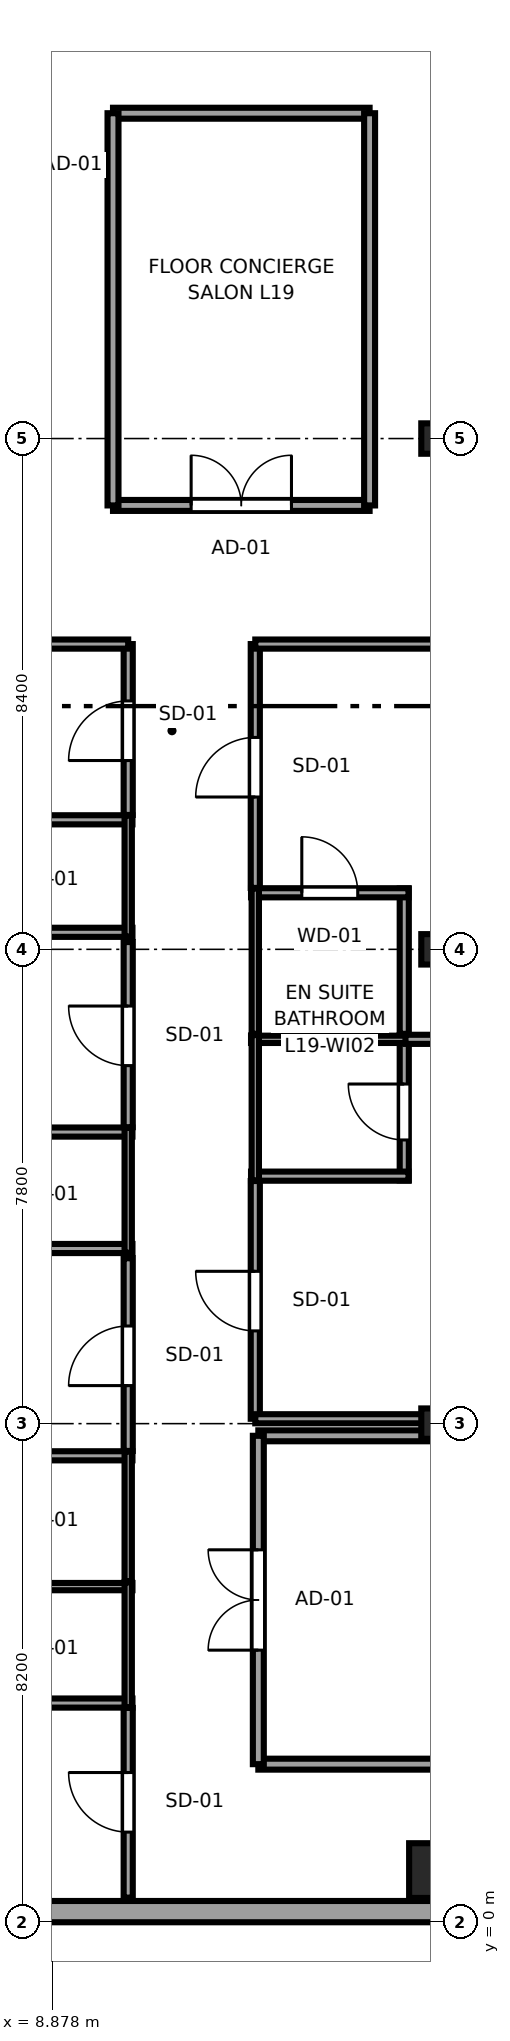
"""IFC4 building model, lengths in metres.
Left out: names, types, materials, properties, quantities, classifications, styles, units other than length and angle.
Written with IfcOpenShell. Run it as: python <this file> out.ifc"""

import sys

from ifc_helpers import new_model, si_unit, direction, frame, frame_2d, origin, origin_2d, place, context, subcontext, project, spatial, rectangle, i_section, extrude, source, transform, mapped, element, fill, save


model = new_model("IFC4")
c1 = context("Model", 3, precision=1e-05, world=origin(), true_north=direction((0.0, 1.0)))
c2 = subcontext(c1, "Body", "Model", "MODEL_VIEW")
j1 = project(units=[si_unit("LENGTHUNIT", "METRE"), si_unit("PLANEANGLEUNIT", "RADIAN")], contexts=[c1])
p1 = place(None, origin())
s1 = spatial("IfcSite", under=j1, at=p1, CompositionType="ELEMENT")
p2 = place(p1, origin())
s2 = spatial("IfcBuilding", under=s1, at=p2, CompositionType="ELEMENT")
p3 = place(p2, frame((0.0, 0.0, 78.15)))
s3 = spatial("IfcBuildingStorey", under=s2, at=p3, CompositionType="ELEMENT", Elevation=78.15)
m1 = source(origin(), c2, "Body", "SweptSolid", [
    extrude(rectangle(XDim=0.9, YDim=0.9, at=origin_2d()), origin(), (0.0, 0.0, 1.0), 3.55),
])
p4 = place(p3, frame((15.2, 0.85, 0.0), z_axis=(0.0, 0.0, 1.0), x_axis=(1.0, 0.0, 0.0)))
e1 = element("IfcColumn", 1, at=p4, inside=s3, PredefinedType="COLUMN", context=c2, shape_type="MappedRepresentation", body=[
    mapped(m1, transform((0.0, 0.0, 0.0), x_axis=(1.0, 0.0, 0.0), y_axis=(0.0, 1.0, 0.0), z_axis=(0.0, 0.0, 1.0), scale=1.0)),
])
m2 = source(origin(), c2, "Body", "SweptSolid", [
    extrude(i_section(OverallWidth=0.5, OverallDepth=0.5, WebThickness=0.022, FlangeThickness=0.034, at=origin_2d()), origin(), (0.0, 0.0, 1.0), 3.55),
])
for number, where, z_axis, x_axis in (
    (2, (15.2, 8.2, 0.0), (0.0, 0.0, 1.0), (1.0, 0.0, 0.0)),
    (3, (15.2, 16.0, 0.0), (0.0, 0.0, 1.0), (1.0, 0.0, 0.0)),
    (4, (15.2, 24.4, 0.0), (0.0, 0.0, 1.0), (1.0, 0.0, 0.0)),
):
    element("IfcColumn", number, at=place(p3, frame(where, z_axis=z_axis, x_axis=x_axis)), inside=s3, PredefinedType="COLUMN", context=c2, shape_type="MappedRepresentation", body=[
        mapped(m2, transform((0.0, 0.0, 0.0), x_axis=(1.0, 0.0, 0.0), y_axis=(0.0, 1.0, 0.0), z_axis=(0.0, 0.0, 1.0), scale=1.0)),
    ])
p5 = place(p3, frame((4.617, 0.175, 0.0), z_axis=(0.0, 0.0, 1.0), x_axis=(1.0, 0.0, 0.0)))
e5 = element("IfcWall", 5, at=p5, inside=s3, PredefinedType="SOLIDWALL", context=c2, shape_type="SweptSolid", body=[
    extrude(rectangle(XDim=18.008, YDim=0.35, at=frame_2d((9.004, 0.0))), origin(), (0.0, 0.0, 1.0), 3.37),
])
p6 = place(p5, frame((14.332, 0.0, 0.68)))
e6 = element("IfcOpeningElement", 6, at=p6, cuts=e5, PredefinedType="OPENING", context=c2, shape_type="SweptSolid", body=[
    extrude(rectangle(XDim=1.95, YDim=1.82, at=frame_2d((0.975, 0.91))), frame((0.0, 0.185, 0.0), z_axis=(0.0, -1.0, 0.0), x_axis=(1.0, 0.0, 0.0)), (0.0, 0.0, 1.0), 0.37),
])
p7 = place(p5, frame((2.091, 0.0, 0.62)))
e7 = element("IfcOpeningElement", 7, at=p7, cuts=e5, PredefinedType="OPENING", context=c2, shape_type="SweptSolid", body=[
    extrude(rectangle(XDim=1.5, YDim=1.55, at=frame_2d((0.75, 0.775))), frame((0.0, 0.185, 0.0), z_axis=(0.0, -1.0, 0.0), x_axis=(1.0, 0.0, 0.0)), (0.0, 0.0, 1.0), 0.37),
])
p8 = place(p3, frame((7.61, 3.605, 0.0), z_axis=(0.0, 0.0, 1.0), x_axis=(1.0, 0.0, 0.0)))
e8 = element("IfcWall", 8, at=p8, inside=s3, PredefinedType="PARTITIONING", context=c2, shape_type="SweptSolid", body=[
    extrude(rectangle(XDim=2.59, YDim=0.15, at=frame_2d((1.295, 0.0))), origin(), (0.0, 0.0, 1.0), 3.37),
])
p9 = place(p3, frame((7.61, 5.52, 0.0), z_axis=(0.0, 0.0, 1.0), x_axis=(1.0, 0.0, 0.0)))
e9 = element("IfcWall", 9, at=p9, inside=s3, PredefinedType="PLUMBINGWALL", context=c2, shape_type="SweptSolid", body=[
    extrude(rectangle(XDim=2.59, YDim=0.12, at=frame_2d((1.295, 0.0))), origin(), (0.0, 0.0, 1.0), 3.37),
])
p10 = place(p3, frame((10.13, 3.535, 0.0), z_axis=(0.0, 0.0, 1.0), x_axis=(0.0, 1.0, 0.0)))
e10 = element("IfcWall", 10, at=p10, inside=s3, PredefinedType="PLUMBINGWALL", context=c2, shape_type="SweptSolid", body=[
    extrude(rectangle(XDim=2.055, YDim=0.12, at=frame_2d((1.028, 0.0))), origin(), (0.0, 0.0, 1.0), 3.37),
])
p11 = place(p3, frame((7.61, 7.671, 0.0), z_axis=(0.0, 0.0, 1.0), x_axis=(1.0, 0.0, 0.0)))
e11 = element("IfcWall", 11, at=p11, inside=s3, PredefinedType="PARTITIONING", context=c2, shape_type="SweptSolid", body=[
    extrude(rectangle(XDim=2.59, YDim=0.15, at=frame_2d((1.295, 0.0))), origin(), (0.0, 0.0, 1.0), 3.37),
])
p12 = place(p3, frame((10.13, 5.61, 0.0), z_axis=(0.0, 0.0, 1.0), x_axis=(0.0, 1.0, 0.0)))
e12 = element("IfcWall", 12, at=p12, inside=s3, PredefinedType="PLUMBINGWALL", context=c2, shape_type="SweptSolid", body=[
    extrude(rectangle(XDim=2.131, YDim=0.12, at=frame_2d((1.065, 0.0))), origin(), (0.0, 0.0, 1.0), 3.37),
])
p13 = place(p3, frame((0.405, 11.08, 0.0), z_axis=(0.0, 0.0, 1.0), x_axis=(1.0, 0.0, 0.0)))
e13 = element("IfcWall", 13, at=p13, inside=s3, PredefinedType="PARTITIONING", context=c2, shape_type="SweptSolid", body=[
    extrude(rectangle(XDim=9.795, YDim=0.15, at=frame_2d((4.897, 0.0))), origin(), (0.0, 0.0, 1.0), 3.37),
])
p14 = place(p3, frame((7.61, 12.995, 0.0), z_axis=(0.0, 0.0, 1.0), x_axis=(1.0, 0.0, 0.0)))
e14 = element("IfcWall", 14, at=p14, inside=s3, PredefinedType="PARTITIONING", context=c2, shape_type="SweptSolid", body=[
    extrude(rectangle(XDim=2.59, YDim=0.15, at=frame_2d((1.295, 0.0))), origin(), (0.0, 0.0, 1.0), 3.37),
])
p15 = place(p3, frame((10.13, 11.01, 0.0), z_axis=(0.0, 0.0, 1.0), x_axis=(0.0, 1.0, 0.0)))
e15 = element("IfcWall", 15, at=p15, inside=s3, PredefinedType="PLUMBINGWALL", context=c2, shape_type="SweptSolid", body=[
    extrude(rectangle(XDim=2.055, YDim=0.12, at=frame_2d((1.027, 0.0))), origin(), (0.0, 0.0, 1.0), 3.37),
])
p16 = place(p3, frame((0.405, 16.28, 0.0), z_axis=(0.0, 0.0, 1.0), x_axis=(1.0, 0.0, 0.0)))
e16 = element("IfcWall", 16, at=p16, inside=s3, PredefinedType="PARTITIONING", context=c2, shape_type="SweptSolid", body=[
    extrude(rectangle(XDim=9.795, YDim=0.15, at=frame_2d((4.897, 0.0))), origin(), (0.0, 0.0, 1.0), 3.37),
])
p17 = place(p3, frame((7.61, 18.13, 0.0), z_axis=(0.0, 0.0, 1.0), x_axis=(1.0, 0.0, 0.0)))
e17 = element("IfcWall", 17, at=p17, inside=s3, PredefinedType="PARTITIONING", context=c2, shape_type="SweptSolid", body=[
    extrude(rectangle(XDim=2.59, YDim=0.15, at=frame_2d((1.295, 0.0))), origin(), (0.0, 0.0, 1.0), 3.37),
])
p18 = place(p3, frame((10.13, 16.21, 0.0), z_axis=(0.0, 0.0, 1.0), x_axis=(0.0, 1.0, 0.0)))
e18 = element("IfcWall", 18, at=p18, inside=s3, PredefinedType="PLUMBINGWALL", context=c2, shape_type="SweptSolid", body=[
    extrude(rectangle(XDim=1.99, YDim=0.12, at=frame_2d((0.995, 0.0))), origin(), (0.0, 0.0, 1.0), 3.37),
])
p19 = place(p3, frame((14.67, 12.2, 0.0), z_axis=(0.0, 0.0, 1.0), x_axis=(0.0, 1.0, 0.0)))
e19 = element("IfcWall", 19, at=p19, inside=s3, PredefinedType="PARTITIONING", context=c2, shape_type="SweptSolid", body=[
    extrude(rectangle(XDim=2.39, YDim=0.15, at=frame_2d((1.195, 0.0))), origin(), (0.0, 0.0, 1.0), 3.37),
])
p20 = place(p19, frame((0.665, 0.0, 0.0)))
e20 = element("IfcOpeningElement", 20, at=p20, cuts=e19, PredefinedType="OPENING", context=c2, shape_type="SweptSolid", body=[
    extrude(rectangle(XDim=0.92, YDim=2.01, at=frame_2d((0.46, 1.005))), frame((0.0, 0.085, 0.0), z_axis=(0.0, -1.0, 0.0), x_axis=(1.0, 0.0, 0.0)), (0.0, 0.0, 1.0), 0.17),
])
p21 = place(p3, frame((12.15, 12.27, 0.0), z_axis=(0.0, 0.0, 1.0), x_axis=(1.0, 0.0, 0.0)))
e21 = element("IfcWall", 21, at=p21, inside=s3, PredefinedType="PARTITIONING", context=c2, shape_type="SweptSolid", body=[
    extrude(rectangle(XDim=2.59, YDim=0.15, at=frame_2d((1.295, 0.0))), origin(), (0.0, 0.0, 1.0), 3.37),
])
p22 = place(p3, frame((12.15, 14.52, 0.0), z_axis=(0.0, 0.0, 1.0), x_axis=(1.0, 0.0, 0.0)))
e22 = element("IfcWall", 22, at=p22, inside=s3, PredefinedType="PLUMBINGWALL", context=c2, shape_type="SweptSolid", body=[
    extrude(rectangle(XDim=2.59, YDim=0.12, at=frame_2d((1.295, 0.0))), origin(), (0.0, 0.0, 1.0), 3.37),
])
p23 = place(p3, frame((12.22, 12.2, 0.0), z_axis=(0.0, 0.0, 1.0), x_axis=(0.0, 1.0, 0.0)))
e23 = element("IfcWall", 23, at=p23, inside=s3, PredefinedType="PLUMBINGWALL", context=c2, shape_type="SweptSolid", body=[
    extrude(rectangle(XDim=2.39, YDim=0.12, at=frame_2d((1.195, 0.0))), origin(), (0.0, 0.0, 1.0), 3.37),
])
p24 = place(p3, frame((14.67, 14.61, 0.0), z_axis=(0.0, 0.0, 1.0), x_axis=(0.0, 1.0, 0.0)))
e24 = element("IfcWall", 24, at=p24, inside=s3, PredefinedType="PARTITIONING", context=c2, shape_type="SweptSolid", body=[
    extrude(rectangle(XDim=2.39, YDim=0.15, at=frame_2d((1.195, 0.0))), origin(), (0.0, 0.0, 1.0), 3.37),
])
p25 = place(p3, frame((12.15, 16.93, 0.0), z_axis=(0.0, 0.0, 1.0), x_axis=(1.0, 0.0, 0.0)))
e25 = element("IfcWall", 25, at=p25, inside=s3, PredefinedType="PARTITIONING", context=c2, shape_type="SweptSolid", body=[
    extrude(rectangle(XDim=2.59, YDim=0.15, at=frame_2d((1.295, 0.0))), origin(), (0.0, 0.0, 1.0), 3.37),
])
p26 = place(p25, frame((0.835, 0.0, 0.0)))
e26 = element("IfcOpeningElement", 26, at=p26, cuts=e25, PredefinedType="OPENING", context=c2, shape_type="SweptSolid", body=[
    extrude(rectangle(XDim=0.92, YDim=2.01, at=frame_2d((0.46, 1.005))), frame((0.0, 0.085, 0.0), z_axis=(0.0, -1.0, 0.0), x_axis=(1.0, 0.0, 0.0)), (0.0, 0.0, 1.0), 0.17),
])
p27 = place(p3, frame((12.22, 14.61, 0.0), z_axis=(0.0, 0.0, 1.0), x_axis=(0.0, 1.0, 0.0)))
e27 = element("IfcWall", 27, at=p27, inside=s3, PredefinedType="PLUMBINGWALL", context=c2, shape_type="SweptSolid", body=[
    extrude(rectangle(XDim=2.39, YDim=0.12, at=frame_2d((1.195, 0.0))), origin(), (0.0, 0.0, 1.0), 3.37),
])
p28 = place(p3, frame((10.13, 0.405, 0.0), z_axis=(0.0, 0.0, 1.0), x_axis=(0.0, 1.0, 0.0)))
e28 = element("IfcWall", 28, at=p28, inside=s3, PredefinedType="PARTITIONING", context=c2, shape_type="SweptSolid", body=[
    extrude(rectangle(XDim=3.12, YDim=0.15, at=frame_2d((1.56, 0.0))), origin(), (0.0, 0.0, 1.0), 3.37),
])
p29 = place(p28, frame((1.077, 0.0, 0.0)))
e29 = element("IfcOpeningElement", 29, at=p29, cuts=e28, PredefinedType="OPENING", context=c2, shape_type="SweptSolid", body=[
    extrude(rectangle(XDim=0.98, YDim=2.12, at=frame_2d((0.49, 1.06))), frame((0.0, 0.085, 0.0), z_axis=(0.0, -1.0, 0.0), x_axis=(1.0, 0.0, 0.0)), (0.0, 0.0, 1.0), 0.17),
])
p30 = place(p3, frame((10.13, 7.751, 0.0), z_axis=(0.0, 0.0, 1.0), x_axis=(0.0, 1.0, 0.0)))
e30 = element("IfcWall", 30, at=p30, inside=s3, PredefinedType="PARTITIONING", context=c2, shape_type="SweptSolid", body=[
    extrude(rectangle(XDim=3.169, YDim=0.15, at=frame_2d((1.584, 0.0))), origin(), (0.0, 0.0, 1.0), 3.37),
])
p31 = place(p30, frame((1.074, 0.0, 0.0)))
e31 = element("IfcOpeningElement", 31, at=p31, cuts=e30, PredefinedType="OPENING", context=c2, shape_type="SweptSolid", body=[
    extrude(rectangle(XDim=0.98, YDim=2.12, at=frame_2d((0.49, 1.06))), frame((0.0, 0.085, 0.0), z_axis=(0.0, -1.0, 0.0), x_axis=(1.0, 0.0, 0.0)), (0.0, 0.0, 1.0), 0.17),
])
p32 = place(p3, frame((10.13, 13.075, 0.0), z_axis=(0.0, 0.0, 1.0), x_axis=(0.0, 1.0, 0.0)))
e32 = element("IfcWall", 32, at=p32, inside=s3, PredefinedType="PARTITIONING", context=c2, shape_type="SweptSolid", body=[
    extrude(rectangle(XDim=3.045, YDim=0.15, at=frame_2d((1.522, 0.0))), origin(), (0.0, 0.0, 1.0), 3.37),
])
p33 = place(p32, frame((1.012, 0.0, 0.0)))
e33 = element("IfcOpeningElement", 33, at=p33, cuts=e32, PredefinedType="OPENING", context=c2, shape_type="SweptSolid", body=[
    extrude(rectangle(XDim=0.98, YDim=2.12, at=frame_2d((0.49, 1.06))), frame((0.0, 0.085, 0.0), z_axis=(0.0, -1.0, 0.0), x_axis=(1.0, 0.0, 0.0)), (0.0, 0.0, 1.0), 0.17),
])
p34 = place(p3, frame((10.13, 18.21, 0.0), z_axis=(0.0, 0.0, 1.0), x_axis=(0.0, 1.0, 0.0)))
e34 = element("IfcWall", 34, at=p34, inside=s3, PredefinedType="PARTITIONING", context=c2, shape_type="SweptSolid", body=[
    extrude(rectangle(XDim=2.81, YDim=0.15, at=frame_2d((1.405, 0.0))), origin(), (0.0, 0.0, 1.0), 3.37),
])
p35 = place(p34, frame((0.895, 0.0, 0.0)))
e35 = element("IfcOpeningElement", 35, at=p35, cuts=e34, PredefinedType="OPENING", context=c2, shape_type="SweptSolid", body=[
    extrude(rectangle(XDim=0.98, YDim=2.12, at=frame_2d((0.49, 1.06))), frame((0.0, 0.085, 0.0), z_axis=(0.0, -1.0, 0.0), x_axis=(1.0, 0.0, 0.0)), (0.0, 0.0, 1.0), 0.17),
])
p36 = place(p3, frame((0.405, 21.02, 0.0), z_axis=(0.0, 0.0, 1.0), x_axis=(1.0, 0.0, 0.0)))
e36 = element("IfcWall", 36, at=p36, inside=s3, PredefinedType="PARTITIONING", context=c2, shape_type="SweptSolid", body=[
    extrude(rectangle(XDim=9.725, YDim=0.15, at=frame_2d((4.862, 0.0))), origin(), (0.0, 0.0, 1.0), 3.37),
])
p37 = place(p3, frame((12.22, 8.28, 0.0), z_axis=(0.0, 0.0, 1.0), x_axis=(0.0, 1.0, 0.0)))
e37 = element("IfcWall", 37, at=p37, inside=s3, PredefinedType="PARTITIONING", context=c2, shape_type="SweptSolid", body=[
    extrude(rectangle(XDim=3.91, YDim=0.15, at=frame_2d((1.955, 0.0))), origin(), (0.0, 0.0, 1.0), 3.37),
])
p38 = place(p37, frame((1.445, 0.0, 0.0)))
e38 = element("IfcOpeningElement", 38, at=p38, cuts=e37, PredefinedType="OPENING", context=c2, shape_type="SweptSolid", body=[
    extrude(rectangle(XDim=0.98, YDim=2.12, at=frame_2d((0.49, 1.06))), frame((0.0, 0.085, 0.0), z_axis=(0.0, -1.0, 0.0), x_axis=(1.0, 0.0, 0.0)), (0.0, 0.0, 1.0), 0.17),
])
p39 = place(p3, frame((12.22, 8.28, 0.0), z_axis=(0.0, 0.0, 1.0), x_axis=(1.0, 0.0, 0.0)))
e39 = element("IfcWall", 39, at=p39, inside=s3, PredefinedType="PARTITIONING", context=c2, shape_type="SweptSolid", body=[
    extrude(rectangle(XDim=10.13, YDim=0.15, at=frame_2d((5.065, 0.0))), origin(), (0.0, 0.0, 1.0), 2.748),
])
p40 = place(p3, frame((14.69, 14.52, 0.0), z_axis=(0.0, 0.0, 1.0), x_axis=(1.0, 0.0, 0.0)))
e40 = element("IfcWall", 40, at=p40, inside=s3, PredefinedType="PARTITIONING", context=c2, shape_type="SweptSolid", body=[
    extrude(rectangle(XDim=7.66, YDim=0.15, at=frame_2d((3.83, 0.0))), origin(), (0.0, 0.0, 1.0), 3.37),
])
p41 = place(p3, frame((12.22, 17.01, 0.0), z_axis=(0.0, 0.0, 1.0), x_axis=(0.0, 1.0, 0.0)))
e41 = element("IfcWall", 41, at=p41, inside=s3, PredefinedType="PARTITIONING", context=c2, shape_type="SweptSolid", body=[
    extrude(rectangle(XDim=4.01, YDim=0.15, at=frame_2d((2.005, 0.0))), origin(), (0.0, 0.0, 1.0), 3.37),
])
p42 = place(p41, frame((1.495, 0.0, 0.0)))
e42 = element("IfcOpeningElement", 42, at=p42, cuts=e41, PredefinedType="OPENING", context=c2, shape_type="SweptSolid", body=[
    extrude(rectangle(XDim=0.98, YDim=2.12, at=frame_2d((0.49, 1.06))), frame((0.0, 0.085, 0.0), z_axis=(0.0, -1.0, 0.0), x_axis=(1.0, 0.0, 0.0)), (0.0, 0.0, 1.0), 0.17),
])
p43 = place(p3, frame((12.22, 21.02, 0.0), z_axis=(0.0, 0.0, 1.0), x_axis=(1.0, 0.0, 0.0)))
e43 = element("IfcWall", 43, at=p43, inside=s3, PredefinedType="PARTITIONING", context=c2, shape_type="SweptSolid", body=[
    extrude(rectangle(XDim=10.13, YDim=0.15, at=frame_2d((5.065, 0.0))), origin(), (0.0, 0.0, 1.0), 3.37),
])
p44 = place(p3, frame((9.88, 23.3, 0.0), z_axis=(0.0, 0.0, 1.0), x_axis=(1.0, 0.0, 0.0)))
e44 = element("IfcWall", 44, at=p44, inside=s3, PredefinedType="PARTITIONING", context=c2, shape_type="SweptSolid", body=[
    extrude(rectangle(XDim=4.22, YDim=0.18, at=frame_2d((2.11, 0.0))), origin(), (0.0, 0.0, 1.0), 3.37),
])
p45 = place(p44, frame((1.285, 0.0, 0.0)))
e45 = element("IfcOpeningElement", 45, at=p45, cuts=e44, PredefinedType="OPENING", context=c2, shape_type="SweptSolid", body=[
    extrude(rectangle(XDim=1.65, YDim=2.15, at=frame_2d((0.825, 1.075))), frame((0.0, 0.1, 0.0), z_axis=(0.0, -1.0, 0.0), x_axis=(1.0, 0.0, 0.0)), (0.0, 0.0, 1.0), 0.2),
])
p46 = place(p3, frame((9.88, 29.75, 0.0), z_axis=(0.0, 0.0, 1.0), x_axis=(1.0, 0.0, 0.0)))
e46 = element("IfcWall", 46, at=p46, inside=s3, PredefinedType="PARTITIONING", context=c2, shape_type="SweptSolid", body=[
    extrude(rectangle(XDim=4.22, YDim=0.18, at=frame_2d((2.11, 0.0))), origin(), (0.0, 0.0, 1.0), 3.37),
])
for number, where, z_axis, x_axis in (
    (47, (9.88, 23.3, 0.0), (0.0, 0.0, 1.0), (0.0, 1.0, 0.0)),
    (48, (14.1, 23.3, 0.0), (0.0, 0.0, 1.0), (0.0, 1.0, 0.0)),
):
    element("IfcWall", number, at=place(p3, frame(where, z_axis=z_axis, x_axis=x_axis)), inside=s3, PredefinedType="PARTITIONING", context=c2, shape_type="SweptSolid", body=[
        extrude(rectangle(XDim=6.45, YDim=0.18, at=frame_2d((3.225, 0.0))), origin(), (0.0, 0.0, 1.0), 3.37),
    ])
for number, where, z_axis, x_axis in (
    (49, (12.27, 2.6, 0.0), (0.0, 0.0, 1.0), (1.0, 0.0, 0.0)),
    (50, (12.27, 8.0, 0.0), (0.0, 0.0, 1.0), (1.0, 0.0, 0.0)),
):
    element("IfcWall", number, at=place(p3, frame(where, z_axis=z_axis, x_axis=x_axis)), inside=s3, PredefinedType="PARTITIONING", context=c2, shape_type="SweptSolid", body=[
        extrude(rectangle(XDim=34.01, YDim=0.18, at=frame_2d((17.005, 0.0))), origin(), (0.0, 0.0, 1.0), 3.37),
    ])
p47 = place(p3, frame((12.27, 2.6, 0.0), z_axis=(0.0, 0.0, 1.0), x_axis=(0.0, 1.0, 0.0)))
e51 = element("IfcWall", 51, at=p47, inside=s3, PredefinedType="PARTITIONING", context=c2, shape_type="SweptSolid", body=[
    extrude(rectangle(XDim=5.4, YDim=0.18, at=frame_2d((2.7, 0.0))), origin(), (0.0, 0.0, 1.0), 3.37),
])
p48 = place(p47, frame((1.875, 0.0, 0.0)))
e52 = element("IfcOpeningElement", 52, at=p48, cuts=e51, PredefinedType="OPENING", context=c2, shape_type="SweptSolid", body=[
    extrude(rectangle(XDim=1.65, YDim=2.15, at=frame_2d((0.825, 1.075))), frame((0.0, 0.1, 0.0), z_axis=(0.0, -1.0, 0.0), x_axis=(1.0, 0.0, 0.0)), (0.0, 0.0, 1.0), 0.2),
])
m3 = source(origin(), c2, "Body", "SweptSolid", [
    extrude(rectangle(XDim=0.92, YDim=2.01, at=frame_2d((0.46, 1.005))), frame((0.0, 0.025, 0.0), z_axis=(0.0, -1.0, 0.0), x_axis=(1.0, 0.0, 0.0)), (0.0, 0.0, 1.0), 0.05),
])
p49 = place(p20, origin())
e53 = element("IfcDoor", 53, at=p49, inside=s3, OperationType="SINGLE_SWING_RIGHT", PredefinedType="DOOR", context=c2, shape_type="MappedRepresentation", body=[
    mapped(m3, transform((0.0, 0.0, 0.0), x_axis=(1.0, 0.0, 0.0), y_axis=(0.0, 1.0, 0.0), z_axis=(0.0, 0.0, 1.0), scale=1.0)),
])
fill(e20, e53)
p50 = place(p26, origin())
e54 = element("IfcDoor", 54, at=p50, inside=s3, OperationType="SINGLE_SWING_LEFT", PredefinedType="DOOR", context=c2, shape_type="MappedRepresentation", body=[
    mapped(m3, transform((0.0, 0.0, 0.0), x_axis=(1.0, 0.0, 0.0), y_axis=(0.0, 1.0, 0.0), z_axis=(0.0, 0.0, 1.0), scale=1.0)),
])
fill(e26, e54)
m4 = source(origin(), c2, "Body", "SweptSolid", [
    extrude(rectangle(XDim=0.98, YDim=2.12, at=frame_2d((0.49, 1.06))), frame((0.0, 0.025, 0.0), z_axis=(0.0, -1.0, 0.0), x_axis=(1.0, 0.0, 0.0)), (0.0, 0.0, 1.0), 0.05),
])
p51 = place(p29, origin())
e55 = element("IfcDoor", 55, at=p51, inside=s3, OperationType="SINGLE_SWING_RIGHT", PredefinedType="DOOR", context=c2, shape_type="MappedRepresentation", body=[
    mapped(m4, transform((0.0, 0.0, 0.0), x_axis=(1.0, 0.0, 0.0), y_axis=(0.0, 1.0, 0.0), z_axis=(0.0, 0.0, 1.0), scale=1.0)),
])
fill(e29, e55)
p52 = place(p31, origin())
e56 = element("IfcDoor", 56, at=p52, inside=s3, OperationType="SINGLE_SWING_LEFT", PredefinedType="DOOR", context=c2, shape_type="MappedRepresentation", body=[
    mapped(m4, transform((0.0, 0.0, 0.0), x_axis=(1.0, 0.0, 0.0), y_axis=(0.0, 1.0, 0.0), z_axis=(0.0, 0.0, 1.0), scale=1.0)),
])
fill(e31, e56)
p53 = place(p33, origin())
e57 = element("IfcDoor", 57, at=p53, inside=s3, OperationType="SINGLE_SWING_RIGHT", PredefinedType="DOOR", context=c2, shape_type="MappedRepresentation", body=[
    mapped(m4, transform((0.0, 0.0, 0.0), x_axis=(1.0, 0.0, 0.0), y_axis=(0.0, 1.0, 0.0), z_axis=(0.0, 0.0, 1.0), scale=1.0)),
])
fill(e33, e57)
p54 = place(p35, origin())
e58 = element("IfcDoor", 58, at=p54, inside=s3, OperationType="SINGLE_SWING_LEFT", PredefinedType="DOOR", context=c2, shape_type="MappedRepresentation", body=[
    mapped(m4, transform((0.0, 0.0, 0.0), x_axis=(1.0, 0.0, 0.0), y_axis=(0.0, 1.0, 0.0), z_axis=(0.0, 0.0, 1.0), scale=1.0)),
])
fill(e35, e58)
p55 = place(p38, origin())
e59 = element("IfcDoor", 59, at=p55, inside=s3, OperationType="SINGLE_SWING_RIGHT", PredefinedType="DOOR", context=c2, shape_type="MappedRepresentation", body=[
    mapped(m4, transform((0.0, 0.0, 0.0), x_axis=(1.0, 0.0, 0.0), y_axis=(0.0, 1.0, 0.0), z_axis=(0.0, 0.0, 1.0), scale=1.0)),
])
fill(e38, e59)
p56 = place(p42, origin())
e60 = element("IfcDoor", 60, at=p56, inside=s3, OperationType="SINGLE_SWING_LEFT", PredefinedType="DOOR", context=c2, shape_type="MappedRepresentation", body=[
    mapped(m4, transform((0.0, 0.0, 0.0), x_axis=(1.0, 0.0, 0.0), y_axis=(0.0, 1.0, 0.0), z_axis=(0.0, 0.0, 1.0), scale=1.0)),
])
fill(e42, e60)
m5 = source(origin(), c2, "Body", "SweptSolid", [
    extrude(rectangle(XDim=1.65, YDim=2.15, at=frame_2d((0.825, 1.075))), frame((0.0, 0.025, 0.0), z_axis=(0.0, -1.0, 0.0), x_axis=(1.0, 0.0, 0.0)), (0.0, 0.0, 1.0), 0.05),
])
p57 = place(p45, origin())
e61 = element("IfcDoor", 61, at=p57, inside=s3, OperationType="DOUBLE_DOOR_SINGLE_SWING", PredefinedType="DOOR", context=c2, shape_type="MappedRepresentation", body=[
    mapped(m5, transform((0.0, 0.0, 0.0), x_axis=(1.0, 0.0, 0.0), y_axis=(0.0, 1.0, 0.0), z_axis=(0.0, 0.0, 1.0), scale=1.0)),
])
fill(e45, e61)
p58 = place(p48, origin())
e62 = element("IfcDoor", 62, at=p58, inside=s3, OperationType="DOUBLE_DOOR_SINGLE_SWING", PredefinedType="DOOR", context=c2, shape_type="MappedRepresentation", body=[
    mapped(m5, transform((0.0, 0.0, 0.0), x_axis=(1.0, 0.0, 0.0), y_axis=(0.0, 1.0, 0.0), z_axis=(0.0, 0.0, 1.0), scale=1.0)),
])
fill(e52, e62)
save(model, sys.argv[1])
